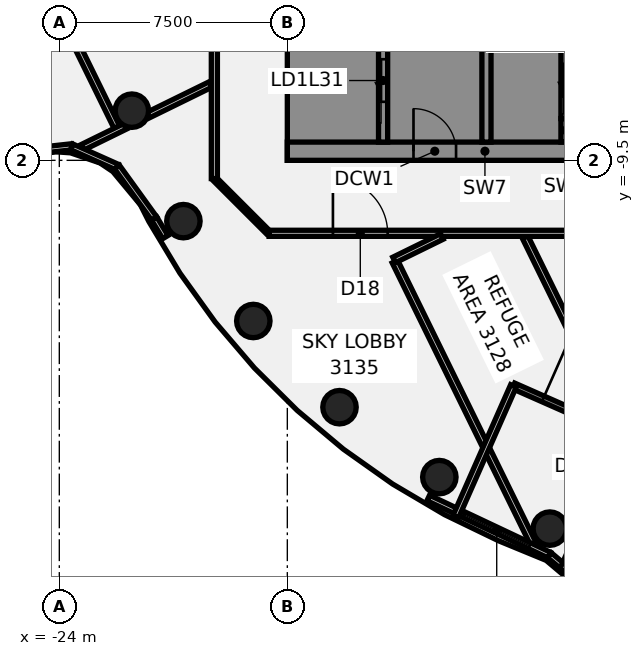
"""IFC4 building model, lengths in metres.
Left out: names, types, materials, properties, quantities, classifications, styles, units other than length and angle.
Written with IfcOpenShell. Run it as: python <this file> out.ifc"""

import sys

from ifc_helpers import new_model, si_unit, direction, frame, frame_2d, origin, origin_2d, place, context, subcontext, project, spatial, polyline, rectangle, circle, outline, extrude, element, fill, save


model = new_model("IFC4")
c1 = context("Model", 3, precision=1e-05, world=origin(), true_north=direction((0.0, 1.0)))
c2 = subcontext(c1, "Body", "Model", "MODEL_VIEW")
j1 = project(units=[si_unit("LENGTHUNIT", "METRE"), si_unit("PLANEANGLEUNIT", "RADIAN")], contexts=[c1])
p1 = place(None, origin())
s1 = spatial("IfcSite", under=j1, at=p1, CompositionType="ELEMENT")
p2 = place(p1, origin())
s2 = spatial("IfcBuilding", under=s1, at=p2, CompositionType="ELEMENT")
p3 = place(p2, frame((0.0, 0.0, 128.5)))
s3 = spatial("IfcBuildingStorey", under=s2, at=p3, CompositionType="ELEMENT", Elevation=128.5)
for number, where, z_axis, x_axis in (
    (1, (-21.613, -7.866, -0.18), (0.0, 0.0, 1.0), (1.0, 0.0, 0.0)),
    (2, (-19.919, -11.5, -0.18), (0.0, 0.0, 1.0), (1.0, 0.0, 0.0)),
    (3, (-17.619, -14.784, -0.18), (0.0, 0.0, 1.0), (1.0, 0.0, 0.0)),
    (4, (-14.784, -17.619, -0.18), (0.0, 0.0, 1.0), (1.0, 0.0, 0.0)),
    (5, (-11.5, -19.919, -0.18), (0.0, 0.0, 1.0), (1.0, 0.0, 0.0)),
    (6, (-7.866, -21.613, -0.18), (0.0, 0.0, 1.0), (1.0, 0.0, 0.0)),
):
    element("IfcColumn", number, at=place(p3, frame(where, z_axis=z_axis, x_axis=x_axis)), inside=s3, PredefinedType="COLUMN", context=c2, shape_type="SweptSolid", body=[
        extrude(circle(Radius=0.55, at=origin_2d()), origin(), (0.0, 0.0, 1.0), 4.54),
    ])
p4 = place(p3, frame((-28.361, 4.342, 0.0), z_axis=(0.0, 0.0, 1.0), x_axis=(0.440288230416, -0.89785648862, 0.0)))
e7 = element("IfcWall", 7, at=p4, inside=s3, PredefinedType="PARTITIONING", context=c2, shape_type="SweptSolid", body=[
    extrude(rectangle(XDim=14.199, YDim=0.2, at=frame_2d((7.1, 0.0))), origin(), (0.0, 0.0, 1.0), 3.66),
])
p5 = place(p4, frame((6.1, 0.0, 0.0)))
e8 = element("IfcOpeningElement", 8, at=p5, cuts=e7, PredefinedType="OPENING", context=c2, shape_type="SweptSolid", body=[
    extrude(rectangle(XDim=1.4, YDim=2.1, at=frame_2d((0.7, 1.05))), frame((0.0, 0.11, 0.0), z_axis=(0.0, -1.0, 0.0), x_axis=(1.0, 0.0, 0.0)), (0.0, 0.0, 1.0), 0.22),
])
p6 = place(p3, frame((-12.961, -12.83, 0.0), z_axis=(0.0, 0.0, 1.0), x_axis=(0.44020582269, -0.897896894788, 0.0)))
e9 = element("IfcWall", 9, at=p6, inside=s3, PredefinedType="PARTITIONING", context=c2, shape_type="SweptSolid", body=[
    extrude(rectangle(XDim=10.402, YDim=0.2, at=frame_2d((5.201, 0.0))), origin(), (0.0, 0.0, 1.0), 3.66),
])
p7 = place(p3, frame((-8.677, -12.026, 0.0), z_axis=(0.0, 0.0, 1.0), x_axis=(0.440258895861, -0.897870873018, 0.0)))
e10 = element("IfcWall", 10, at=p7, inside=s3, PredefinedType="PARTITIONING", context=c2, shape_type="SweptSolid", body=[
    extrude(rectangle(XDim=11.312, YDim=0.2, at=frame_2d((5.656, 0.0))), origin(), (0.0, 0.0, 1.0), 3.66),
])
p8 = place(p7, frame((3.31, 0.0, 0.0)))
e11 = element("IfcOpeningElement", 11, at=p8, cuts=e10, PredefinedType="OPENING", context=c2, shape_type="SweptSolid", body=[
    extrude(rectangle(XDim=1.8, YDim=2.1, at=frame_2d((0.9, 1.05))), frame((0.0, 0.11, 0.0), z_axis=(0.0, -1.0, 0.0), x_axis=(1.0, 0.0, 0.0)), (0.0, 0.0, 1.0), 0.22),
])
p9 = place(p3, frame((-18.865, -10.135, 0.0), z_axis=(0.0, 0.0, 1.0), x_axis=(0.707106781187, -0.707106781187, 0.0)))
e12 = element("IfcWall", 12, at=p9, inside=s3, PredefinedType="PARTITIONING", context=c2, shape_type="SweptSolid", body=[
    extrude(rectangle(XDim=2.445, YDim=0.15, at=frame_2d((1.223, 0.0))), origin(), (0.0, 0.0, 1.0), 3.66),
])
p10 = place(p3, frame((-17.1, -11.9, 0.0), z_axis=(0.0, 0.0, 1.0), x_axis=(1.0, 0.0, 0.0)))
e13 = element("IfcWall", 13, at=p10, inside=s3, PredefinedType="PARTITIONING", context=c2, shape_type="SweptSolid", body=[
    extrude(rectangle(XDim=34.145, YDim=0.2, at=frame_2d((17.073, 0.0))), origin(), (0.0, 0.0, 1.0), 3.66),
])
p11 = place(p10, frame((11.211, 0.0, 0.0)))
e14 = element("IfcOpeningElement", 14, at=p11, cuts=e13, PredefinedType="OPENING", context=c2, shape_type="SweptSolid", body=[
    extrude(rectangle(XDim=1.8, YDim=2.1, at=frame_2d((0.9, 1.05))), frame((0.0, 0.11, 0.0), z_axis=(0.0, -1.0, 0.0), x_axis=(1.0, 0.0, 0.0)), (0.0, 0.0, 1.0), 0.22),
])
p12 = place(p10, frame((2.1, 0.0, 0.0)))
e15 = element("IfcOpeningElement", 15, at=p12, cuts=e13, PredefinedType="OPENING", context=c2, shape_type="SweptSolid", body=[
    extrude(rectangle(XDim=1.8, YDim=2.1, at=frame_2d((0.9, 1.05))), frame((0.0, 0.11, 0.0), z_axis=(0.0, -1.0, 0.0), x_axis=(1.0, 0.0, 0.0)), (0.0, 0.0, 1.0), 0.22),
])
p13 = place(p10, frame((26.462, 0.0, 0.0)))
e16 = element("IfcOpeningElement", 16, at=p13, cuts=e13, PredefinedType="OPENING", context=c2, shape_type="SweptSolid", body=[
    extrude(rectangle(XDim=1.8, YDim=2.1, at=frame_2d((0.9, 1.05))), frame((0.0, 0.11, 0.0), z_axis=(0.0, -1.0, 0.0), x_axis=(1.0, 0.0, 0.0)), (0.0, 0.0, 1.0), 0.22),
])
p14 = place(p3, frame((-23.236, -9.071, 0.0), z_axis=(0.0, 0.0, 1.0), x_axis=(0.897851466588, 0.440298471432, 0.0)))
e17 = element("IfcWall", 17, at=p14, inside=s3, PredefinedType="PARTITIONING", context=c2, shape_type="SweptSolid", body=[
    extrude(rectangle(XDim=1.585, YDim=0.2, at=frame_2d((0.792, 0.0))), origin(), (0.0, 0.0, 1.0), 3.66),
])
p15 = place(p3, frame((-21.094, -8.02, 0.0), z_axis=(0.0, 0.0, 1.0), x_axis=(0.897834472142, 0.440333124616, 0.0)))
e18 = element("IfcWall", 18, at=p15, inside=s3, PredefinedType="PARTITIONING", context=c2, shape_type="SweptSolid", body=[
    extrude(rectangle(XDim=2.304, YDim=0.2, at=frame_2d((1.152, 0.0))), origin(), (0.0, 0.0, 1.0), 3.66),
])
p16 = place(p3, frame((-12.987, -12.776, 0.0), z_axis=(0.0, 0.0, 1.0), x_axis=(0.897834179061, 0.440333722204, 0.0)))
e19 = element("IfcWall", 19, at=p16, inside=s3, PredefinedType="PARTITIONING", context=c2, shape_type="SweptSolid", body=[
    extrude(rectangle(XDim=1.749, YDim=0.2, at=frame_2d((0.875, 0.0))), origin(), (0.0, 0.0, 1.0), 3.66),
])
p17 = place(p3, frame((-18.9, -10.1, 0.0), z_axis=(0.0, 0.0, 1.0), x_axis=(0.0, 1.0, 0.0)))
e20 = element("IfcWall", 20, at=p17, inside=s3, PredefinedType="PARTITIONING", context=c2, shape_type="SweptSolid", body=[
    extrude(rectangle(XDim=20.2, YDim=0.2, at=frame_2d((10.1, 0.0))), origin(), (0.0, 0.0, 1.0), 3.66),
])
p18 = place(p17, frame((11.583, 0.0, 0.0)))
e21 = element("IfcOpeningElement", 21, at=p18, cuts=e20, PredefinedType="OPENING", context=c2, shape_type="SweptSolid", body=[
    extrude(rectangle(XDim=1.8, YDim=2.1, at=frame_2d((0.9, 1.05))), frame((0.0, 0.11, 0.0), z_axis=(0.0, -1.0, 0.0), x_axis=(1.0, 0.0, 0.0)), (0.0, 0.0, 1.0), 0.22),
])
p19 = place(p17, frame((4.356, 0.0, 0.0)))
e22 = element("IfcOpeningElement", 22, at=p19, cuts=e20, PredefinedType="OPENING", context=c2, shape_type="SweptSolid", body=[
    extrude(rectangle(XDim=1.4, YDim=2.1, at=frame_2d((0.7, 1.05))), frame((0.0, 0.11, 0.0), z_axis=(0.0, -1.0, 0.0), x_axis=(1.0, 0.0, 0.0)), (0.0, 0.0, 1.0), 0.22),
])
p20 = place(p3, frame((-25.313, -9.244, 0.0), z_axis=(0.0, 0.0, 1.0), x_axis=(0.993989934895, 0.109471500068, 0.0)))
e23 = element("IfcWall", 23, at=p20, inside=s3, PredefinedType="SOLIDWALL", context=c2, shape_type="SweptSolid", body=[
    extrude(rectangle(XDim=1.731, YDim=0.2, at=frame_2d((0.865, 0.0))), origin(), (0.0, 0.0, 1.0), 4.36),
])
p21 = place(p3, frame((-23.593, -9.055, 0.0), z_axis=(0.0, 0.0, 1.0), x_axis=(0.913174690869, -0.407568379485, 0.0)))
e24 = element("IfcWall", 24, at=p21, inside=s3, PredefinedType="SOLIDWALL", context=c2, shape_type="SweptSolid", body=[
    extrude(rectangle(XDim=1.631, YDim=0.2, at=frame_2d((0.815, 0.0))), origin(), (0.0, 0.0, 1.0), 4.36),
])
p22 = place(p3, frame((-22.103, -9.72, 0.0), z_axis=(0.0, 0.0, 1.0), x_axis=(0.585383960687, -0.810756201685, 0.0)))
e25 = element("IfcWall", 25, at=p22, inside=s3, PredefinedType="SOLIDWALL", context=c2, shape_type="SweptSolid", body=[
    extrude(rectangle(XDim=2.091, YDim=0.2, at=frame_2d((1.045, 0.0))), origin(), (0.0, 0.0, 1.0), 4.36),
])
p23 = place(p3, frame((-20.879, -11.415, 0.0), z_axis=(0.0, 0.0, 1.0), x_axis=(0.515806457806, -0.856705140691, 0.0)))
e26 = element("IfcWall", 26, at=p23, inside=s3, PredefinedType="SOLIDWALL", context=c2, shape_type="SweptSolid", body=[
    extrude(rectangle(XDim=0.712, YDim=0.2, at=frame_2d((0.356, 0.0))), origin(), (0.0, 0.0, 1.0), 4.36),
])
p24 = place(p3, frame((-11.865, -20.605, 0.0), z_axis=(0.0, 0.0, 1.0), x_axis=(0.904385974053, -0.426715373448, 0.0)))
e27 = element("IfcWall", 27, at=p24, inside=s3, PredefinedType="SOLIDWALL", context=c2, shape_type="SweptSolid", body=[
    extrude(rectangle(XDim=4.403, YDim=0.2, at=frame_2d((2.202, 0.0))), origin(), (0.0, 0.0, 1.0), 4.36),
])
p25 = place(p24, frame((1.29, 0.0, 1.4)))
e28 = element("IfcOpeningElement", 28, at=p25, cuts=e27, PredefinedType="OPENING", context=c2, shape_type="SweptSolid", body=[
    extrude(rectangle(XDim=2.4, YDim=2.1, at=frame_2d((1.2, 1.05))), frame((0.0, 0.11, 0.0), z_axis=(0.0, -1.0, 0.0), x_axis=(1.0, 0.0, 0.0)), (0.0, 0.0, 1.0), 0.22),
])
p26 = place(p3, frame((-7.882, -22.484, 0.0), z_axis=(0.0, 0.0, 1.0), x_axis=(0.765040402091, -0.643982284825, 0.0)))
e29 = element("IfcWall", 29, at=p26, inside=s3, PredefinedType="SOLIDWALL", context=c2, shape_type="SweptSolid", body=[
    extrude(rectangle(XDim=1.666, YDim=0.2, at=frame_2d((0.833, 0.0))), origin(), (0.0, 0.0, 1.0), 4.36),
])
p27 = place(p3, frame((-9.061, -16.918, 0.0), z_axis=(0.0, 0.0, 1.0), x_axis=(0.914869848832, -0.403748881978, 0.0)))
e30 = element("IfcWall", 30, at=p27, inside=s3, PredefinedType="SOLIDWALL", context=c2, shape_type="SweptSolid", body=[
    extrude(rectangle(XDim=3.927, YDim=0.2, at=frame_2d((1.963, 0.0))), origin(), (0.0, 0.0, 1.0), 4.36),
])
p28 = place(p27, frame((1.063, 0.0, 0.0)))
e31 = element("IfcOpeningElement", 31, at=p28, cuts=e30, PredefinedType="OPENING", context=c2, shape_type="SweptSolid", body=[
    extrude(rectangle(XDim=1.8, YDim=2.4, at=frame_2d((0.9, 1.2))), frame((0.0, 0.11, 0.0), z_axis=(0.0, -1.0, 0.0), x_axis=(1.0, 0.0, 0.0)), (0.0, 0.0, 1.0), 0.22),
])
p29 = place(p3, frame((-9.062, -16.918, 0.0), z_axis=(0.0, 0.0, 1.0), x_axis=(-0.403733506443, -0.914876634184, 0.0)))
e32 = element("IfcWall", 32, at=p29, inside=s3, PredefinedType="SOLIDWALL", context=c2, shape_type="SweptSolid", body=[
    extrude(rectangle(XDim=4.703, YDim=0.2, at=frame_2d((2.352, 0.0))), origin(), (0.0, 0.0, 1.0), 4.36),
])
p30 = place(p3, frame((-5.469, -18.503, 0.0), z_axis=(0.0, 0.0, 1.0), x_axis=(-0.403691721509, -0.914895072664, 0.0)))
e33 = element("IfcWall", 33, at=p30, inside=s3, PredefinedType="SOLIDWALL", context=c2, shape_type="SweptSolid", body=[
    extrude(rectangle(XDim=4.9, YDim=0.2, at=frame_2d((2.45, 0.0))), origin(), (0.0, 0.0, 1.0), 4.36),
])
p31 = place(p3, frame((-16.5, -9.2, 0.0), z_axis=(0.0, 0.0, 1.0), x_axis=(1.0, 0.0, 0.0)))
e34 = element("IfcWall", 34, at=p31, inside=s3, PredefinedType="SHEAR", context=c2, shape_type="SweptSolid", body=[
    extrude(rectangle(XDim=13.0, YDim=0.6, at=frame_2d((6.5, 0.0))), origin(), (0.0, 0.0, 1.0), 4.36),
])
p32 = place(p31, frame((4.15, 0.0, 0.0)))
e35 = element("IfcOpeningElement", 35, at=p32, cuts=e34, PredefinedType="OPENING", context=c2, shape_type="SweptSolid", body=[
    extrude(rectangle(XDim=1.4, YDim=2.1, at=frame_2d((0.7, 1.05))), frame((0.0, 0.31, 0.0), z_axis=(0.0, -1.0, 0.0), x_axis=(1.0, 0.0, 0.0)), (0.0, 0.0, 1.0), 0.62),
])
p33 = place(p31, frame((10.125, 0.0, 0.0)))
e36 = element("IfcOpeningElement", 36, at=p33, cuts=e34, PredefinedType="OPENING", context=c2, shape_type="SweptSolid", body=[
    extrude(rectangle(XDim=1.4, YDim=2.1, at=frame_2d((0.7, 1.05))), frame((0.0, 0.31, 0.0), z_axis=(0.0, -1.0, 0.0), x_axis=(1.0, 0.0, 0.0)), (0.0, 0.0, 1.0), 0.62),
])
p34 = place(p3, origin())
e37 = element("IfcWall", 37, at=p34, inside=s3, PredefinedType="SHEAR", context=c2, shape_type="SweptSolid", body=[
    extrude(outline(polyline([(-13.5, -8.9), (-13.5, -8.125), (-15.9, -8.125), (-15.9, -5.625), (-13.5, -5.625), (-13.5, -5.375), (-15.9, -5.375), (-15.9, -2.875), (-13.5, -2.875), (-13.5, -2.625), (-15.9, -2.625), (-15.9, -0.125), (-13.5, -0.125), (-13.5, 0.125), (-15.9, 0.125), (-15.9, 2.625), (-13.5, 2.625), (-13.5, 2.875), (-15.9, 2.875), (-15.9, 5.375), (-13.5, 5.375), (-13.5, 5.625), (-15.9, 5.625), (-15.9, 8.125), (-13.5, 8.125), (-13.5, 8.9), (-15.9, 8.9), (-16.5, 8.9), (-16.5, -8.9), (-15.9, -8.9), (-13.5, -8.9)])), origin(), (0.0, 0.0, 1.0), 4.36),
])
p35 = place(p3, origin())
e38 = element("IfcWall", 38, at=p35, inside=s3, PredefinedType="SHEAR", context=c2, shape_type="SweptSolid", body=[
    extrude(outline(polyline([(-7.5, -8.125), (-9.55, -8.125), (-9.55, -5.625), (-9.8, -5.625), (-9.8, -8.125), (-9.8, -8.9), (-7.5, -8.9), (-7.5, -8.125)])), origin(), (0.0, 0.0, 1.0), 4.36),
])
p36 = place(p3, frame((-7.35, -8.9, 0.0), z_axis=(0.0, 0.0, 1.0), x_axis=(0.0, 1.0, 0.0)))
e39 = element("IfcWall", 39, at=p36, inside=s3, PredefinedType="SHEAR", context=c2, shape_type="SweptSolid", body=[
    extrude(rectangle(XDim=0.775, YDim=0.3, at=frame_2d((0.387, 0.0))), origin(), (0.0, 0.0, 1.0), 4.36),
])
p37 = place(p3, frame((-13.35, -8.9, 0.0), z_axis=(0.0, 0.0, 1.0), x_axis=(0.0, 1.0, 0.0)))
e40 = element("IfcWall", 40, at=p37, inside=s3, PredefinedType="SHEAR", context=c2, shape_type="SweptSolid", body=[
    extrude(rectangle(XDim=17.8, YDim=0.3, at=frame_2d((8.9, 0.0))), origin(), (0.0, 0.0, 1.0), 4.36),
])
p38 = place(p37, frame((1.325, 0.0, 0.0)))
e41 = element("IfcOpeningElement", 41, at=p38, cuts=e40, PredefinedType="OPENING", context=c2, shape_type="SweptSolid", body=[
    extrude(rectangle(XDim=1.4, YDim=2.1, at=frame_2d((0.7, 1.05))), frame((0.0, 0.16, 0.0), z_axis=(0.0, -1.0, 0.0), x_axis=(1.0, 0.0, 0.0)), (0.0, 0.0, 1.0), 0.32),
])
p39 = place(p37, frame((4.225, 0.0, 0.0)))
e42 = element("IfcOpeningElement", 42, at=p39, cuts=e40, PredefinedType="OPENING", context=c2, shape_type="SweptSolid", body=[
    extrude(rectangle(XDim=1.1, YDim=2.1, at=frame_2d((0.55, 1.05))), frame((0.0, 0.16, 0.0), z_axis=(0.0, -1.0, 0.0), x_axis=(1.0, 0.0, 0.0)), (0.0, 0.0, 1.0), 0.32),
])
p40 = place(p37, frame((6.975, 0.0, 0.0)))
e43 = element("IfcOpeningElement", 43, at=p40, cuts=e40, PredefinedType="OPENING", context=c2, shape_type="SweptSolid", body=[
    extrude(rectangle(XDim=1.1, YDim=2.1, at=frame_2d((0.55, 1.05))), frame((0.0, 0.16, 0.0), z_axis=(0.0, -1.0, 0.0), x_axis=(1.0, 0.0, 0.0)), (0.0, 0.0, 1.0), 0.32),
])
p41 = place(p37, frame((9.725, 0.0, 0.0)))
e44 = element("IfcOpeningElement", 44, at=p41, cuts=e40, PredefinedType="OPENING", context=c2, shape_type="SweptSolid", body=[
    extrude(rectangle(XDim=1.1, YDim=2.1, at=frame_2d((0.55, 1.05))), frame((0.0, 0.16, 0.0), z_axis=(0.0, -1.0, 0.0), x_axis=(1.0, 0.0, 0.0)), (0.0, 0.0, 1.0), 0.32),
])
p42 = place(p37, frame((12.475, 0.0, 0.0)))
e45 = element("IfcOpeningElement", 45, at=p42, cuts=e40, PredefinedType="OPENING", context=c2, shape_type="SweptSolid", body=[
    extrude(rectangle(XDim=1.1, YDim=2.1, at=frame_2d((0.55, 1.05))), frame((0.0, 0.16, 0.0), z_axis=(0.0, -1.0, 0.0), x_axis=(1.0, 0.0, 0.0)), (0.0, 0.0, 1.0), 0.32),
])
p43 = place(p3, frame((-9.95, -8.9, 0.0), z_axis=(0.0, 0.0, 1.0), x_axis=(0.0, 1.0, 0.0)))
e46 = element("IfcWall", 46, at=p43, inside=s3, PredefinedType="SHEAR", context=c2, shape_type="SweptSolid", body=[
    extrude(rectangle(XDim=17.8, YDim=0.3, at=frame_2d((8.9, 0.0))), origin(), (0.0, 0.0, 1.0), 4.36),
])
p44 = place(p43, frame((4.175, 0.0, 0.0)))
e47 = element("IfcOpeningElement", 47, at=p44, cuts=e46, PredefinedType="OPENING", context=c2, shape_type="SweptSolid", body=[
    extrude(rectangle(XDim=1.2, YDim=2.1, at=frame_2d((0.6, 1.05))), frame((0.0, 0.16, 0.0), z_axis=(0.0, -1.0, 0.0), x_axis=(1.0, 0.0, 0.0)), (0.0, 0.0, 1.0), 0.32),
])
p45 = place(p43, frame((6.925, 0.0, 0.0)))
e48 = element("IfcOpeningElement", 48, at=p45, cuts=e46, PredefinedType="OPENING", context=c2, shape_type="SweptSolid", body=[
    extrude(rectangle(XDim=1.2, YDim=2.1, at=frame_2d((0.6, 1.05))), frame((0.0, 0.16, 0.0), z_axis=(0.0, -1.0, 0.0), x_axis=(1.0, 0.0, 0.0)), (0.0, 0.0, 1.0), 0.32),
])
p46 = place(p3, frame((-7.35, -8.125, 0.0), z_axis=(0.0, 0.0, 1.0), x_axis=(0.0, 1.0, 0.0)))
e49 = element("IfcWall", 49, at=p46, inside=s3, PredefinedType="SHEAR", context=c2, shape_type="SweptSolid", body=[
    extrude(rectangle(XDim=2.5, YDim=0.3, at=frame_2d((1.25, 0.0))), origin(), (0.0, 0.0, 1.0), 4.36),
])
p47 = place(p46, frame((0.7, 0.0, 0.0)))
e50 = element("IfcOpeningElement", 50, at=p47, cuts=e49, PredefinedType="OPENING", context=c2, shape_type="SweptSolid", body=[
    extrude(rectangle(XDim=1.1, YDim=2.1, at=frame_2d((0.55, 1.05))), frame((0.0, 0.16, 0.0), z_axis=(0.0, -1.0, 0.0), x_axis=(1.0, 0.0, 0.0)), (0.0, 0.0, 1.0), 0.32),
])
p48 = place(p12, origin())
e51 = element("IfcDoor", 51, at=p48, inside=s3, OperationType="DOUBLE_DOOR_SINGLE_SWING", PredefinedType="DOOR", context=c2, shape_type="SweptSolid", body=[
    extrude(rectangle(XDim=1.8, YDim=2.1, at=frame_2d((0.9, 1.05))), frame((0.0, 0.025, 0.0), z_axis=(0.0, -1.0, 0.0), x_axis=(1.0, 0.0, 0.0)), (0.0, 0.0, 1.0), 0.05),
])
fill(e15, e51)
p49 = place(p25, origin())
e52 = element("IfcWindow", 52, at=p49, inside=s3, PartitioningType="SINGLE_PANEL", PredefinedType="WINDOW", context=c2, shape_type="SweptSolid", body=[
    extrude(rectangle(XDim=2.4, YDim=2.1, at=frame_2d((1.2, 1.05))), frame((0.0, 0.03, 0.0), z_axis=(0.0, -1.0, 0.0), x_axis=(1.0, 0.0, 0.0)), (0.0, 0.0, 1.0), 0.06),
])
fill(e28, e52)
p50 = place(p28, origin())
e53 = element("IfcDoor", 53, at=p50, inside=s3, OperationType="SINGLE_SWING_LEFT", PredefinedType="DOOR", context=c2, shape_type="SweptSolid", body=[
    extrude(rectangle(XDim=1.8, YDim=2.4, at=frame_2d((0.9, 1.2))), frame((0.0, 0.025, 0.0), z_axis=(0.0, -1.0, 0.0), x_axis=(1.0, 0.0, 0.0)), (0.0, 0.0, 1.0), 0.05),
])
fill(e31, e53)
p51 = place(p32, origin())
e54 = element("IfcDoor", 54, at=p51, inside=s3, OperationType="SINGLE_SWING_LEFT", PredefinedType="DOOR", context=c2, shape_type="SweptSolid", body=[
    extrude(rectangle(XDim=1.4, YDim=2.1, at=frame_2d((0.7, 1.05))), frame((0.0, 0.025, 0.0), z_axis=(0.0, -1.0, 0.0), x_axis=(1.0, 0.0, 0.0)), (0.0, 0.0, 1.0), 0.05),
])
fill(e35, e54)
p52 = place(p38, origin())
e55 = element("IfcDoor", 55, at=p52, inside=s3, OperationType="SLIDING_TO_LEFT", PredefinedType="DOOR", context=c2, shape_type="SweptSolid", body=[
    extrude(rectangle(XDim=1.4, YDim=2.1, at=frame_2d((0.7, 1.05))), frame((0.0, 0.025, 0.0), z_axis=(0.0, -1.0, 0.0), x_axis=(1.0, 0.0, 0.0)), (0.0, 0.0, 1.0), 0.05),
])
fill(e41, e55)
save(model, sys.argv[1])
